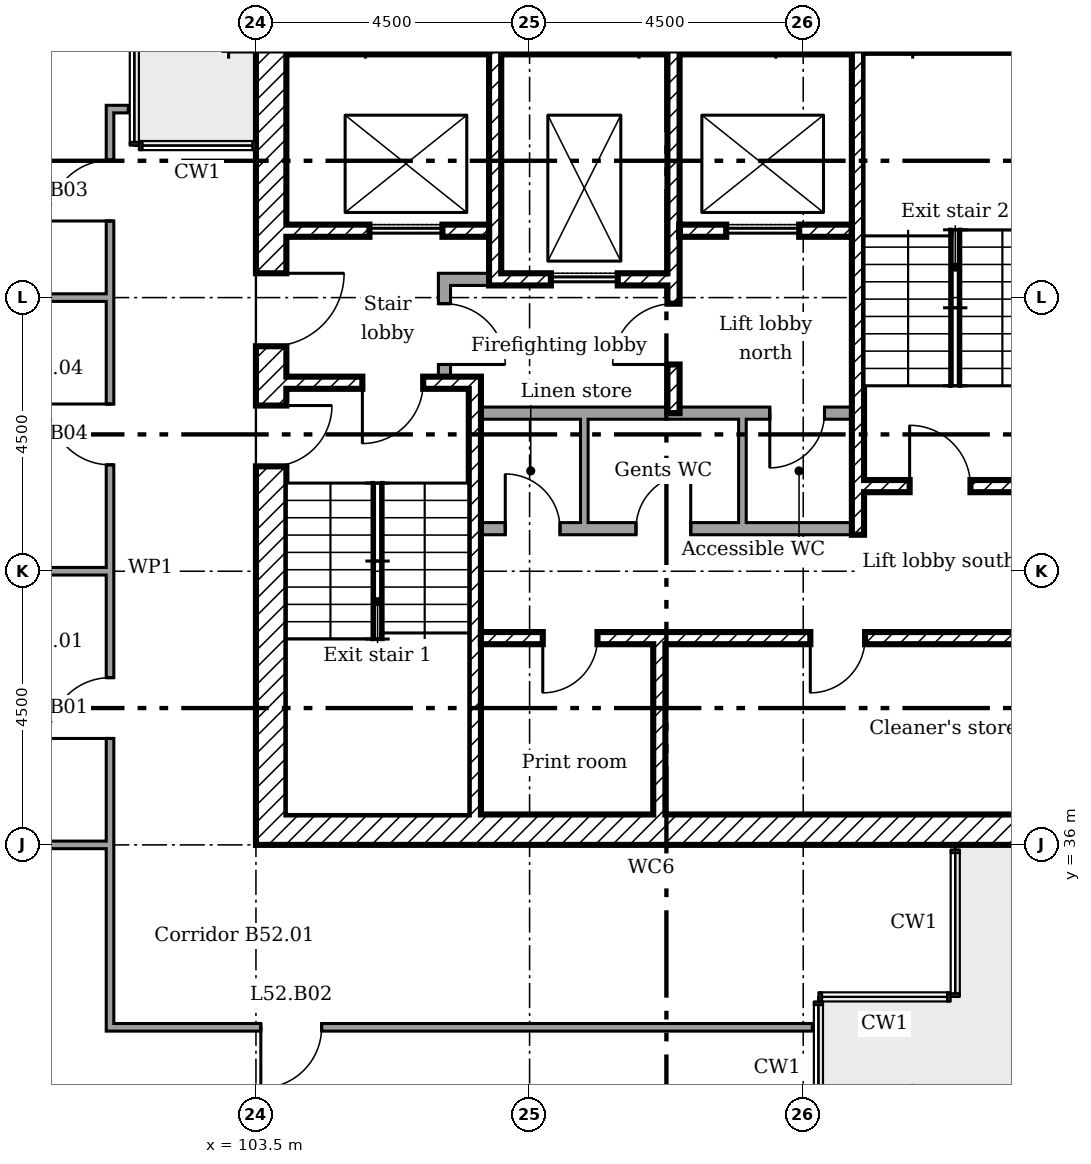
"""IFC4 building model, lengths in metres.
Left out: names, types, materials, properties, quantities, classifications, styles, units other than length and angle.
Written with IfcOpenShell. Run it as: python <this file> out.ifc"""

import sys

from ifc_helpers import new_model, si_unit, direction, frame, frame_2d, origin, place, context, subcontext, project, spatial, rectangle, extrude, element, fill, save


model = new_model("IFC4")
c1 = context("Model", 3, precision=1e-05, world=origin(), true_north=direction((0.0, 1.0)))
c2 = subcontext(c1, "Body", "Model", "MODEL_VIEW")
j1 = project(units=[si_unit("LENGTHUNIT", "METRE"), si_unit("PLANEANGLEUNIT", "RADIAN")], contexts=[c1])
p1 = place(None, origin())
s1 = spatial("IfcSite", under=j1, at=p1, CompositionType="ELEMENT")
p2 = place(p1, origin())
s2 = spatial("IfcBuilding", under=s1, at=p2, CompositionType="ELEMENT")
p3 = place(p2, frame((0.0, 0.0, 206.4)))
s3 = spatial("IfcBuildingStorey", under=s2, at=p3, CompositionType="ELEMENT", Elevation=206.4)
for number, where in (
    (1, (103.5, 49.25, 0.0)),
    (2, (103.5, 36.25, 0.0)),
):
    element("IfcWall", number, at=place(p3, frame(where)), inside=s3, PredefinedType="SHEAR", context=c2, shape_type="SweptSolid", body=[
        extrude(rectangle(XDim=13.0, YDim=0.5, at=frame_2d((6.5, 0.0))), origin(), (0.0, 0.0, 1.0), 3.35),
    ])
p4 = place(p3, frame((103.75, 36.5, 0.0), z_axis=(0.0, 0.0, 1.0), x_axis=(0.0, 1.0, 0.0)))
e3 = element("IfcWall", 3, at=p4, inside=s3, PredefinedType="SHEAR", context=c2, shape_type="SweptSolid", body=[
    extrude(rectangle(XDim=12.5, YDim=0.5, at=frame_2d((6.25, 0.0))), origin(), (0.0, 0.0, 1.0), 3.35),
])
p5 = place(p4, frame((7.7, 0.0, 0.0)))
e4 = element("IfcOpeningElement", 4, at=p5, cuts=e3, PredefinedType="OPENING", context=c2, shape_type="SweptSolid", body=[
    extrude(rectangle(XDim=1.2, YDim=2.1, at=frame_2d((0.6, 1.05))), frame((0.0, 0.26, 0.0), z_axis=(0.0, -1.0, 0.0), x_axis=(1.0, 0.0, 0.0)), (0.0, 0.0, 1.0), 0.52),
])
p6 = place(p4, frame((5.725, 0.0, 0.0)))
e5 = element("IfcOpeningElement", 5, at=p6, cuts=e3, PredefinedType="OPENING", context=c2, shape_type="SweptSolid", body=[
    extrude(rectangle(XDim=1.0, YDim=2.1, at=frame_2d((0.5, 1.05))), frame((0.0, 0.26, 0.0), z_axis=(0.0, -1.0, 0.0), x_axis=(1.0, 0.0, 0.0)), (0.0, 0.0, 1.0), 0.52),
])
p7 = place(p3, frame((107.433, 49.0, 0.0), z_axis=(0.0, 0.0, 1.0), x_axis=(0.0, -1.0, 0.0)))
e6 = element("IfcWall", 6, at=p7, inside=s3, PredefinedType="SHEAR", context=c2, shape_type="SweptSolid", body=[
    extrude(rectangle(XDim=3.8, YDim=0.2, at=frame_2d((1.9, 0.0))), origin(), (0.0, 0.0, 1.0), 3.35),
])
p8 = place(p3, frame((110.367, 49.0, 0.0), z_axis=(0.0, 0.0, 1.0), x_axis=(0.0, -1.0, 0.0)))
e7 = element("IfcWall", 7, at=p8, inside=s3, PredefinedType="SHEAR", context=c2, shape_type="SweptSolid", body=[
    extrude(rectangle(XDim=5.9, YDim=0.2, at=frame_2d((2.95, 0.0))), origin(), (0.0, 0.0, 1.0), 3.35),
])
p9 = place(p8, frame((4.1, 0.0, 0.0)))
e8 = element("IfcOpeningElement", 8, at=p9, cuts=e7, PredefinedType="OPENING", context=c2, shape_type="SweptSolid", body=[
    extrude(rectangle(XDim=1.0, YDim=2.1, at=frame_2d((0.5, 1.05))), frame((0.0, 0.11, 0.0), z_axis=(0.0, -1.0, 0.0), x_axis=(1.0, 0.0, 0.0)), (0.0, 0.0, 1.0), 0.22),
])
p10 = place(p3, frame((110.133, 36.5, 0.0), z_axis=(0.0, 0.0, 1.0), x_axis=(0.0, 1.0, 0.0)))
e9 = element("IfcWall", 9, at=p10, inside=s3, PredefinedType="SHEAR", context=c2, shape_type="SweptSolid", body=[
    extrude(rectangle(XDim=2.8, YDim=0.2, at=frame_2d((1.4, 0.0))), origin(), (0.0, 0.0, 1.0), 3.35),
])
p11 = place(p3, frame((106.5, 45.3, 0.0)))
e10 = element("IfcWall", 10, at=p11, inside=s3, PredefinedType="PARTITIONING", context=c2, shape_type="SweptSolid", body=[
    extrude(rectangle(XDim=0.833, YDim=0.2, at=frame_2d((0.417, 0.0))), origin(), (0.0, 0.0, 1.0), 3.35),
])
p12 = place(p3, frame((106.6, 43.7, 0.0), z_axis=(0.0, 0.0, 1.0), x_axis=(0.0, 1.0, 0.0)))
e11 = element("IfcWall", 11, at=p12, inside=s3, PredefinedType="PARTITIONING", context=c2, shape_type="SweptSolid", body=[
    extrude(rectangle(XDim=1.5, YDim=0.2, at=frame_2d((0.75, 0.0))), origin(), (0.0, 0.0, 1.0), 3.35),
])
p13 = place(p12, frame((0.2, 0.0, 0.0)))
e12 = element("IfcOpeningElement", 12, at=p13, cuts=e11, PredefinedType="OPENING", context=c2, shape_type="SweptSolid", body=[
    extrude(rectangle(XDim=1.0, YDim=2.1, at=frame_2d((0.5, 1.05))), frame((0.0, 0.11, 0.0), z_axis=(0.0, -1.0, 0.0), x_axis=(1.0, 0.0, 0.0)), (0.0, 0.0, 1.0), 0.22),
])
p14 = place(p3, frame((104.0, 46.1, 0.0)))
e13 = element("IfcWall", 13, at=p14, inside=s3, PredefinedType="SHEAR", context=c2, shape_type="SweptSolid", body=[
    extrude(rectangle(XDim=3.333, YDim=0.2, at=frame_2d((1.667, 0.0))), origin(), (0.0, 0.0, 1.0), 3.35),
])
p15 = place(p14, frame((1.367, 0.0, 0.0)))
e14 = element("IfcOpeningElement", 14, at=p15, cuts=e13, PredefinedType="OPENING", context=c2, shape_type="SweptSolid", body=[
    extrude(rectangle(XDim=1.2, YDim=2.1, at=frame_2d((0.6, 1.05))), frame((0.0, 0.11, 0.0), z_axis=(0.0, -1.0, 0.0), x_axis=(1.0, 0.0, 0.0)), (0.0, 0.0, 1.0), 0.22),
])
p16 = place(p3, frame((110.467, 46.1, 0.0)))
e15 = element("IfcWall", 15, at=p16, inside=s3, PredefinedType="SHEAR", context=c2, shape_type="SweptSolid", body=[
    extrude(rectangle(XDim=2.833, YDim=0.2, at=frame_2d((1.417, 0.0))), origin(), (0.0, 0.0, 1.0), 3.35),
])
p17 = place(p16, frame((0.767, 0.0, 0.0)))
e16 = element("IfcOpeningElement", 16, at=p17, cuts=e15, PredefinedType="OPENING", context=c2, shape_type="SweptSolid", body=[
    extrude(rectangle(XDim=1.2, YDim=2.1, at=frame_2d((0.6, 1.05))), frame((0.0, 0.11, 0.0), z_axis=(0.0, -1.0, 0.0), x_axis=(1.0, 0.0, 0.0)), (0.0, 0.0, 1.0), 0.22),
])
p18 = place(p3, frame((107.533, 45.3, 0.0)))
e17 = element("IfcWall", 17, at=p18, inside=s3, PredefinedType="SHEAR", context=c2, shape_type="SweptSolid", body=[
    extrude(rectangle(XDim=2.733, YDim=0.2, at=frame_2d((1.367, 0.0))), origin(), (0.0, 0.0, 1.0), 3.35),
])
p19 = place(p18, frame((0.817, 0.0, 0.0)))
e18 = element("IfcOpeningElement", 18, at=p19, cuts=e17, PredefinedType="OPENING", context=c2, shape_type="SweptSolid", body=[
    extrude(rectangle(XDim=1.1, YDim=2.1, at=frame_2d((0.55, 1.05))), frame((0.0, 0.11, 0.0), z_axis=(0.0, -1.0, 0.0), x_axis=(1.0, 0.0, 0.0)), (0.0, 0.0, 1.0), 0.22),
])
p20 = place(p3, frame((107.2, 39.4, 0.0)))
e19 = element("IfcWall", 19, at=p20, inside=s3, PredefinedType="SHEAR", context=c2, shape_type="SweptSolid", body=[
    extrude(rectangle(XDim=9.3, YDim=0.2, at=frame_2d((4.65, 0.0))), origin(), (0.0, 0.0, 1.0), 3.35),
])
p21 = place(p20, frame((1.017, 0.0, 0.0)))
e20 = element("IfcOpeningElement", 20, at=p21, cuts=e19, PredefinedType="OPENING", context=c2, shape_type="SweptSolid", body=[
    extrude(rectangle(XDim=0.9, YDim=2.1, at=frame_2d((0.45, 1.05))), frame((0.0, 0.11, 0.0), z_axis=(0.0, -1.0, 0.0), x_axis=(1.0, 0.0, 0.0)), (0.0, 0.0, 1.0), 0.22),
])
p22 = place(p20, frame((5.417, 0.0, 0.0)))
e21 = element("IfcOpeningElement", 21, at=p22, cuts=e19, PredefinedType="OPENING", context=c2, shape_type="SweptSolid", body=[
    extrude(rectangle(XDim=0.9, YDim=2.1, at=frame_2d((0.45, 1.05))), frame((0.0, 0.11, 0.0), z_axis=(0.0, -1.0, 0.0), x_axis=(1.0, 0.0, 0.0)), (0.0, 0.0, 1.0), 0.22),
])
p23 = place(p3, frame((107.1, 36.5, 0.0), z_axis=(0.0, 0.0, 1.0), x_axis=(0.0, 1.0, 0.0)))
e22 = element("IfcWall", 22, at=p23, inside=s3, PredefinedType="SHEAR", context=c2, shape_type="SweptSolid", body=[
    extrude(rectangle(XDim=7.2, YDim=0.2, at=frame_2d((3.6, 0.0))), origin(), (0.0, 0.0, 1.0), 3.35),
])
p24 = place(p3, frame((104.0, 43.6, 0.0)))
e23 = element("IfcWall", 23, at=p24, inside=s3, PredefinedType="SHEAR", context=c2, shape_type="SweptSolid", body=[
    extrude(rectangle(XDim=3.0, YDim=0.2, at=frame_2d((1.5, 0.0))), origin(), (0.0, 0.0, 1.0), 3.35),
])
p25 = place(p24, frame((1.25, 0.0, 0.0)))
e24 = element("IfcOpeningElement", 24, at=p25, cuts=e23, PredefinedType="OPENING", context=c2, shape_type="SweptSolid", body=[
    extrude(rectangle(XDim=1.0, YDim=2.1, at=frame_2d((0.5, 1.05))), frame((0.0, 0.11, 0.0), z_axis=(0.0, -1.0, 0.0), x_axis=(1.0, 0.0, 0.0)), (0.0, 0.0, 1.0), 0.22),
])
p26 = place(p3, frame((113.5, 41.9, 0.0)))
e25 = element("IfcWall", 25, at=p26, inside=s3, PredefinedType="SHEAR", context=c2, shape_type="SweptSolid", body=[
    extrude(rectangle(XDim=3.0, YDim=0.2, at=frame_2d((1.5, 0.0))), origin(), (0.0, 0.0, 1.0), 3.35),
])
p27 = place(p26, frame((0.75, 0.0, 0.0)))
e26 = element("IfcOpeningElement", 26, at=p27, cuts=e25, PredefinedType="OPENING", context=c2, shape_type="SweptSolid", body=[
    extrude(rectangle(XDim=1.0, YDim=2.1, at=frame_2d((0.5, 1.05))), frame((0.0, 0.11, 0.0), z_axis=(0.0, -1.0, 0.0), x_axis=(1.0, 0.0, 0.0)), (0.0, 0.0, 1.0), 0.22),
])
p28 = place(p3, frame((113.4, 41.1, 0.0), z_axis=(0.0, 0.0, 1.0), x_axis=(0.0, 1.0, 0.0)))
e27 = element("IfcWall", 27, at=p28, inside=s3, PredefinedType="SHEAR", context=c2, shape_type="SweptSolid", body=[
    extrude(rectangle(XDim=7.9, YDim=0.2, at=frame_2d((3.95, 0.0))), origin(), (0.0, 0.0, 1.0), 3.35),
])
p29 = place(p3, frame((107.2, 43.1, 0.0)))
e28 = element("IfcWall", 28, at=p29, inside=s3, PredefinedType="PARTITIONING", context=c2, shape_type="SweptSolid", body=[
    extrude(rectangle(XDim=6.1, YDim=0.2, at=frame_2d((3.05, 0.0))), origin(), (0.0, 0.0, 1.0), 3.35),
])
p30 = place(p29, frame((4.75, 0.0, 0.0)))
e29 = element("IfcOpeningElement", 29, at=p30, cuts=e28, PredefinedType="OPENING", context=c2, shape_type="SweptSolid", body=[
    extrude(rectangle(XDim=0.9, YDim=2.1, at=frame_2d((0.45, 1.05))), frame((0.0, 0.11, 0.0), z_axis=(0.0, -1.0, 0.0), x_axis=(1.0, 0.0, 0.0)), (0.0, 0.0, 1.0), 0.22),
])
p31 = place(p3, frame((107.2, 41.2, 0.0)))
e30 = element("IfcWall", 30, at=p31, inside=s3, PredefinedType="PARTITIONING", context=c2, shape_type="SweptSolid", body=[
    extrude(rectangle(XDim=6.1, YDim=0.2, at=frame_2d((3.05, 0.0))), origin(), (0.0, 0.0, 1.0), 3.35),
])
p32 = place(p31, frame((0.4, 0.0, 0.0)))
e31 = element("IfcOpeningElement", 31, at=p32, cuts=e30, PredefinedType="OPENING", context=c2, shape_type="SweptSolid", body=[
    extrude(rectangle(XDim=0.9, YDim=2.1, at=frame_2d((0.45, 1.05))), frame((0.0, 0.11, 0.0), z_axis=(0.0, -1.0, 0.0), x_axis=(1.0, 0.0, 0.0)), (0.0, 0.0, 1.0), 0.22),
])
p33 = place(p31, frame((2.55, 0.0, 0.0)))
e32 = element("IfcOpeningElement", 32, at=p33, cuts=e30, PredefinedType="OPENING", context=c2, shape_type="SweptSolid", body=[
    extrude(rectangle(XDim=0.9, YDim=2.1, at=frame_2d((0.45, 1.05))), frame((0.0, 0.11, 0.0), z_axis=(0.0, -1.0, 0.0), x_axis=(1.0, 0.0, 0.0)), (0.0, 0.0, 1.0), 0.22),
])
for number, where, z_axis, x_axis in (
    (33, (108.9, 41.3, 0.0), (0.0, 0.0, 1.0), (0.0, 1.0, 0.0)),
    (34, (111.5, 41.3, 0.0), (0.0, 0.0, 1.0), (0.0, 1.0, 0.0)),
):
    element("IfcWall", number, at=place(p3, frame(where, z_axis=z_axis, x_axis=x_axis)), inside=s3, PredefinedType="PARTITIONING", context=c2, shape_type="SweptSolid", body=[
        extrude(rectangle(XDim=1.7, YDim=0.125, at=frame_2d((0.85, 0.0))), origin(), (0.0, 0.0, 1.0), 3.35),
    ])
p34 = place(p3, frame((101.038, 33.0, 0.0)))
e35 = element("IfcWall", 35, at=p34, inside=s3, PredefinedType="PARTITIONING", context=c2, shape_type="SweptSolid", body=[
    extrude(rectangle(XDim=11.612, YDim=0.125, at=frame_2d((5.806, 0.0))), origin(), (0.0, 0.0, 1.0), 3.45),
])
p35 = place(p34, frame((2.542, 0.0, 0.0)))
e36 = element("IfcOpeningElement", 36, at=p35, cuts=e35, PredefinedType="OPENING", context=c2, shape_type="SweptSolid", body=[
    extrude(rectangle(XDim=1.0, YDim=2.1, at=frame_2d((0.5, 1.05))), frame((0.0, 0.073, 0.0), z_axis=(0.0, -1.0, 0.0), x_axis=(1.0, 0.0, 0.0)), (0.0, 0.0, 1.0), 0.145),
])
p36 = place(p3, frame((99.3, 36.0, 0.0)))
e37 = element("IfcWall", 37, at=p36, inside=s3, PredefinedType="PARTITIONING", context=c2, shape_type="SweptSolid", body=[
    extrude(rectangle(XDim=1.8, YDim=0.125, at=frame_2d((0.9, 0.0))), origin(), (0.0, 0.0, 1.0), 3.45),
])
p37 = place(p3, frame((96.6, 40.5, 0.0)))
e38 = element("IfcWall", 38, at=p37, inside=s3, PredefinedType="MOVABLE", context=c2, shape_type="SweptSolid", body=[
    extrude(rectangle(XDim=4.5, YDim=0.125, at=frame_2d((2.25, 0.0))), origin(), (0.0, 0.0, 1.0), 2.851),
])
p38 = place(p3, frame((96.6, 45.0, 0.0)))
e39 = element("IfcWall", 39, at=p38, inside=s3, PredefinedType="PARTITIONING", context=c2, shape_type="SweptSolid", body=[
    extrude(rectangle(XDim=4.5, YDim=0.125, at=frame_2d((2.25, 0.0))), origin(), (0.0, 0.0, 1.0), 2.851),
])
p39 = place(p3, frame((101.038, 48.1, 0.0)))
e40 = element("IfcWall", 40, at=p39, inside=s3, PredefinedType="PARTITIONING", context=c2, shape_type="SweptSolid", body=[
    extrude(rectangle(XDim=0.362, YDim=0.125, at=frame_2d((0.181, 0.0))), origin(), (0.0, 0.0, 1.0), 3.45),
])
p40 = place(p3, frame((101.1, 33.062, 0.0), z_axis=(0.0, 0.0, 1.0), x_axis=(0.0, 1.0, 0.0)))
e41 = element("IfcWall", 41, at=p40, inside=s3, PredefinedType="PARTITIONING", context=c2, shape_type="SweptSolid", body=[
    extrude(rectangle(XDim=14.975, YDim=0.125, at=frame_2d((7.488, 0.0))), origin(), (0.0, 0.0, 1.0), 3.45),
])
p41 = place(p40, frame((4.688, 0.0, 0.0)))
e42 = element("IfcOpeningElement", 42, at=p41, cuts=e41, PredefinedType="OPENING", context=c2, shape_type="SweptSolid", body=[
    extrude(rectangle(XDim=1.0, YDim=2.1, at=frame_2d((0.5, 1.05))), frame((0.0, 0.073, 0.0), z_axis=(0.0, -1.0, 0.0), x_axis=(1.0, 0.0, 0.0)), (0.0, 0.0, 1.0), 0.145),
])
p42 = place(p40, frame((13.198, 0.0, 0.0)))
e43 = element("IfcOpeningElement", 43, at=p42, cuts=e41, PredefinedType="OPENING", context=c2, shape_type="SweptSolid", body=[
    extrude(rectangle(XDim=1.0, YDim=2.1, at=frame_2d((0.5, 1.05))), frame((0.0, 0.073, 0.0), z_axis=(0.0, -1.0, 0.0), x_axis=(1.0, 0.0, 0.0)), (0.0, 0.0, 1.0), 0.145),
])
p43 = place(p40, frame((9.188, 0.0, 0.0)))
e44 = element("IfcOpeningElement", 44, at=p43, cuts=e41, PredefinedType="OPENING", context=c2, shape_type="SweptSolid", body=[
    extrude(rectangle(XDim=1.0, YDim=2.1, at=frame_2d((0.5, 1.05))), frame((0.0, 0.073, 0.0), z_axis=(0.0, -1.0, 0.0), x_axis=(1.0, 0.0, 0.0)), (0.0, 0.0, 1.0), 0.145),
])
p44 = place(p5, frame((1.2, 0.0, 0.0), x_axis=(-1.0, 0.0, 0.0)))
e45 = element("IfcDoor", 45, at=p44, inside=s3, OperationType="SINGLE_SWING_RIGHT", PredefinedType="DOOR", context=c2, shape_type="SweptSolid", body=[
    extrude(rectangle(XDim=1.2, YDim=2.1, at=frame_2d((0.6, 1.05))), frame((0.0, 0.025, 0.0), z_axis=(0.0, -1.0, 0.0), x_axis=(1.0, 0.0, 0.0)), (0.0, 0.0, 1.0), 0.05),
])
fill(e4, e45)
p45 = place(p25, frame((1.0, 0.0, 0.0), x_axis=(-1.0, 0.0, 0.0)))
e46 = element("IfcDoor", 46, at=p45, inside=s3, OperationType="SINGLE_SWING_LEFT", PredefinedType="DOOR", context=c2, shape_type="SweptSolid", body=[
    extrude(rectangle(XDim=1.0, YDim=2.1, at=frame_2d((0.5, 1.05))), frame((0.0, 0.025, 0.0), z_axis=(0.0, -1.0, 0.0), x_axis=(1.0, 0.0, 0.0)), (0.0, 0.0, 1.0), 0.05),
])
fill(e24, e46)
p46 = place(p6, frame((1.0, 0.0, 0.0), x_axis=(-1.0, 0.0, 0.0)))
e47 = element("IfcDoor", 47, at=p46, inside=s3, OperationType="SINGLE_SWING_RIGHT", PredefinedType="DOOR", context=c2, shape_type="SweptSolid", body=[
    extrude(rectangle(XDim=1.0, YDim=2.1, at=frame_2d((0.5, 1.05))), frame((0.0, 0.025, 0.0), z_axis=(0.0, -1.0, 0.0), x_axis=(1.0, 0.0, 0.0)), (0.0, 0.0, 1.0), 0.05),
])
fill(e5, e47)
p47 = place(p27, origin())
e48 = element("IfcDoor", 48, at=p47, inside=s3, OperationType="SINGLE_SWING_RIGHT", PredefinedType="DOOR", context=c2, shape_type="SweptSolid", body=[
    extrude(rectangle(XDim=1.0, YDim=2.1, at=frame_2d((0.5, 1.05))), frame((0.0, 0.025, 0.0), z_axis=(0.0, -1.0, 0.0), x_axis=(1.0, 0.0, 0.0)), (0.0, 0.0, 1.0), 0.05),
])
fill(e26, e48)
p48 = place(p9, frame((1.0, 0.0, 0.0), x_axis=(-1.0, 0.0, 0.0)))
e49 = element("IfcDoor", 49, at=p48, inside=s3, OperationType="SINGLE_SWING_RIGHT", PredefinedType="DOOR", context=c2, shape_type="SweptSolid", body=[
    extrude(rectangle(XDim=1.0, YDim=2.1, at=frame_2d((0.5, 1.05))), frame((0.0, 0.025, 0.0), z_axis=(0.0, -1.0, 0.0), x_axis=(1.0, 0.0, 0.0)), (0.0, 0.0, 1.0), 0.05),
])
fill(e8, e49)
p49 = place(p13, frame((1.0, 0.0, 0.0), x_axis=(-1.0, 0.0, 0.0)))
e50 = element("IfcDoor", 50, at=p49, inside=s3, OperationType="SINGLE_SWING_LEFT", PredefinedType="DOOR", context=c2, shape_type="SweptSolid", body=[
    extrude(rectangle(XDim=1.0, YDim=2.1, at=frame_2d((0.5, 1.05))), frame((0.0, 0.025, 0.0), z_axis=(0.0, -1.0, 0.0), x_axis=(1.0, 0.0, 0.0)), (0.0, 0.0, 1.0), 0.05),
])
fill(e12, e50)
p50 = place(p21, frame((0.9, 0.0, 0.0), x_axis=(-1.0, 0.0, 0.0)))
e51 = element("IfcDoor", 51, at=p50, inside=s3, OperationType="SINGLE_SWING_LEFT", PredefinedType="DOOR", context=c2, shape_type="SweptSolid", body=[
    extrude(rectangle(XDim=0.9, YDim=2.1, at=frame_2d((0.45, 1.05))), frame((0.0, 0.025, 0.0), z_axis=(0.0, -1.0, 0.0), x_axis=(1.0, 0.0, 0.0)), (0.0, 0.0, 1.0), 0.05),
])
fill(e20, e51)
p51 = place(p22, frame((0.9, 0.0, 0.0), x_axis=(-1.0, 0.0, 0.0)))
e52 = element("IfcDoor", 52, at=p51, inside=s3, OperationType="SINGLE_SWING_LEFT", PredefinedType="DOOR", context=c2, shape_type="SweptSolid", body=[
    extrude(rectangle(XDim=0.9, YDim=2.1, at=frame_2d((0.45, 1.05))), frame((0.0, 0.025, 0.0), z_axis=(0.0, -1.0, 0.0), x_axis=(1.0, 0.0, 0.0)), (0.0, 0.0, 1.0), 0.05),
])
fill(e21, e52)
p52 = place(p32, origin())
e53 = element("IfcDoor", 53, at=p52, inside=s3, OperationType="SINGLE_SWING_RIGHT", PredefinedType="DOOR", context=c2, shape_type="SweptSolid", body=[
    extrude(rectangle(XDim=0.9, YDim=2.1, at=frame_2d((0.45, 1.05))), frame((0.0, 0.025, 0.0), z_axis=(0.0, -1.0, 0.0), x_axis=(1.0, 0.0, 0.0)), (0.0, 0.0, 1.0), 0.05),
])
fill(e31, e53)
p53 = place(p33, origin())
e54 = element("IfcDoor", 54, at=p53, inside=s3, OperationType="SINGLE_SWING_LEFT", PredefinedType="DOOR", context=c2, shape_type="SweptSolid", body=[
    extrude(rectangle(XDim=0.9, YDim=2.1, at=frame_2d((0.45, 1.05))), frame((0.0, 0.025, 0.0), z_axis=(0.0, -1.0, 0.0), x_axis=(1.0, 0.0, 0.0)), (0.0, 0.0, 1.0), 0.05),
])
fill(e32, e54)
p54 = place(p30, frame((0.9, 0.0, 0.0), x_axis=(-1.0, 0.0, 0.0)))
e55 = element("IfcDoor", 55, at=p54, inside=s3, OperationType="SINGLE_SWING_LEFT", PredefinedType="DOOR", context=c2, shape_type="SweptSolid", body=[
    extrude(rectangle(XDim=0.9, YDim=2.1, at=frame_2d((0.45, 1.05))), frame((0.0, 0.025, 0.0), z_axis=(0.0, -1.0, 0.0), x_axis=(1.0, 0.0, 0.0)), (0.0, 0.0, 1.0), 0.05),
])
fill(e29, e55)
p55 = place(p19, origin())
e56 = element("IfcDoor", 56, at=p55, inside=s3, OperationType="SLIDING_TO_LEFT", PredefinedType="DOOR", context=c2, shape_type="SweptSolid", body=[
    extrude(rectangle(XDim=1.1, YDim=2.1, at=frame_2d((0.55, 1.05))), frame((0.0, 0.025, 0.0), z_axis=(0.0, -1.0, 0.0), x_axis=(1.0, 0.0, 0.0)), (0.0, 0.0, 1.0), 0.05),
])
fill(e18, e56)
p56 = place(p15, origin())
e57 = element("IfcDoor", 57, at=p56, inside=s3, OperationType="SLIDING_TO_LEFT", PredefinedType="DOOR", context=c2, shape_type="SweptSolid", body=[
    extrude(rectangle(XDim=1.2, YDim=2.1, at=frame_2d((0.6, 1.05))), frame((0.0, 0.025, 0.0), z_axis=(0.0, -1.0, 0.0), x_axis=(1.0, 0.0, 0.0)), (0.0, 0.0, 1.0), 0.05),
])
fill(e14, e57)
p57 = place(p17, origin())
e58 = element("IfcDoor", 58, at=p57, inside=s3, OperationType="SLIDING_TO_LEFT", PredefinedType="DOOR", context=c2, shape_type="SweptSolid", body=[
    extrude(rectangle(XDim=1.2, YDim=2.1, at=frame_2d((0.6, 1.05))), frame((0.0, 0.025, 0.0), z_axis=(0.0, -1.0, 0.0), x_axis=(1.0, 0.0, 0.0)), (0.0, 0.0, 1.0), 0.05),
])
fill(e16, e58)
p58 = place(p41, origin())
e59 = element("IfcDoor", 59, at=p58, inside=s3, OperationType="SINGLE_SWING_RIGHT", PredefinedType="DOOR", context=c2, shape_type="SweptSolid", body=[
    extrude(rectangle(XDim=1.0, YDim=2.1, at=frame_2d((0.5, 1.05))), frame((0.0, 0.025, 0.0), z_axis=(0.0, -1.0, 0.0), x_axis=(1.0, 0.0, 0.0)), (0.0, 0.0, 1.0), 0.05),
])
fill(e42, e59)
p59 = place(p35, frame((1.0, 0.0, 0.0), x_axis=(-1.0, 0.0, 0.0)))
e60 = element("IfcDoor", 60, at=p59, inside=s3, OperationType="SINGLE_SWING_LEFT", PredefinedType="DOOR", context=c2, shape_type="SweptSolid", body=[
    extrude(rectangle(XDim=1.0, YDim=2.1, at=frame_2d((0.5, 1.05))), frame((0.0, 0.025, 0.0), z_axis=(0.0, -1.0, 0.0), x_axis=(1.0, 0.0, 0.0)), (0.0, 0.0, 1.0), 0.05),
])
fill(e36, e60)
p60 = place(p42, origin())
e61 = element("IfcDoor", 61, at=p60, inside=s3, OperationType="SINGLE_SWING_RIGHT", PredefinedType="DOOR", context=c2, shape_type="SweptSolid", body=[
    extrude(rectangle(XDim=1.0, YDim=2.1, at=frame_2d((0.5, 1.05))), frame((0.0, 0.025, 0.0), z_axis=(0.0, -1.0, 0.0), x_axis=(1.0, 0.0, 0.0)), (0.0, 0.0, 1.0), 0.05),
])
fill(e43, e61)
p61 = place(p43, origin())
e62 = element("IfcDoor", 62, at=p61, inside=s3, OperationType="SINGLE_SWING_LEFT", PredefinedType="DOOR", context=c2, shape_type="SweptSolid", body=[
    extrude(rectangle(XDim=1.0, YDim=2.1, at=frame_2d((0.5, 1.05))), frame((0.0, 0.025, 0.0), z_axis=(0.0, -1.0, 0.0), x_axis=(1.0, 0.0, 0.0)), (0.0, 0.0, 1.0), 0.05),
])
fill(e44, e62)
save(model, sys.argv[1])
